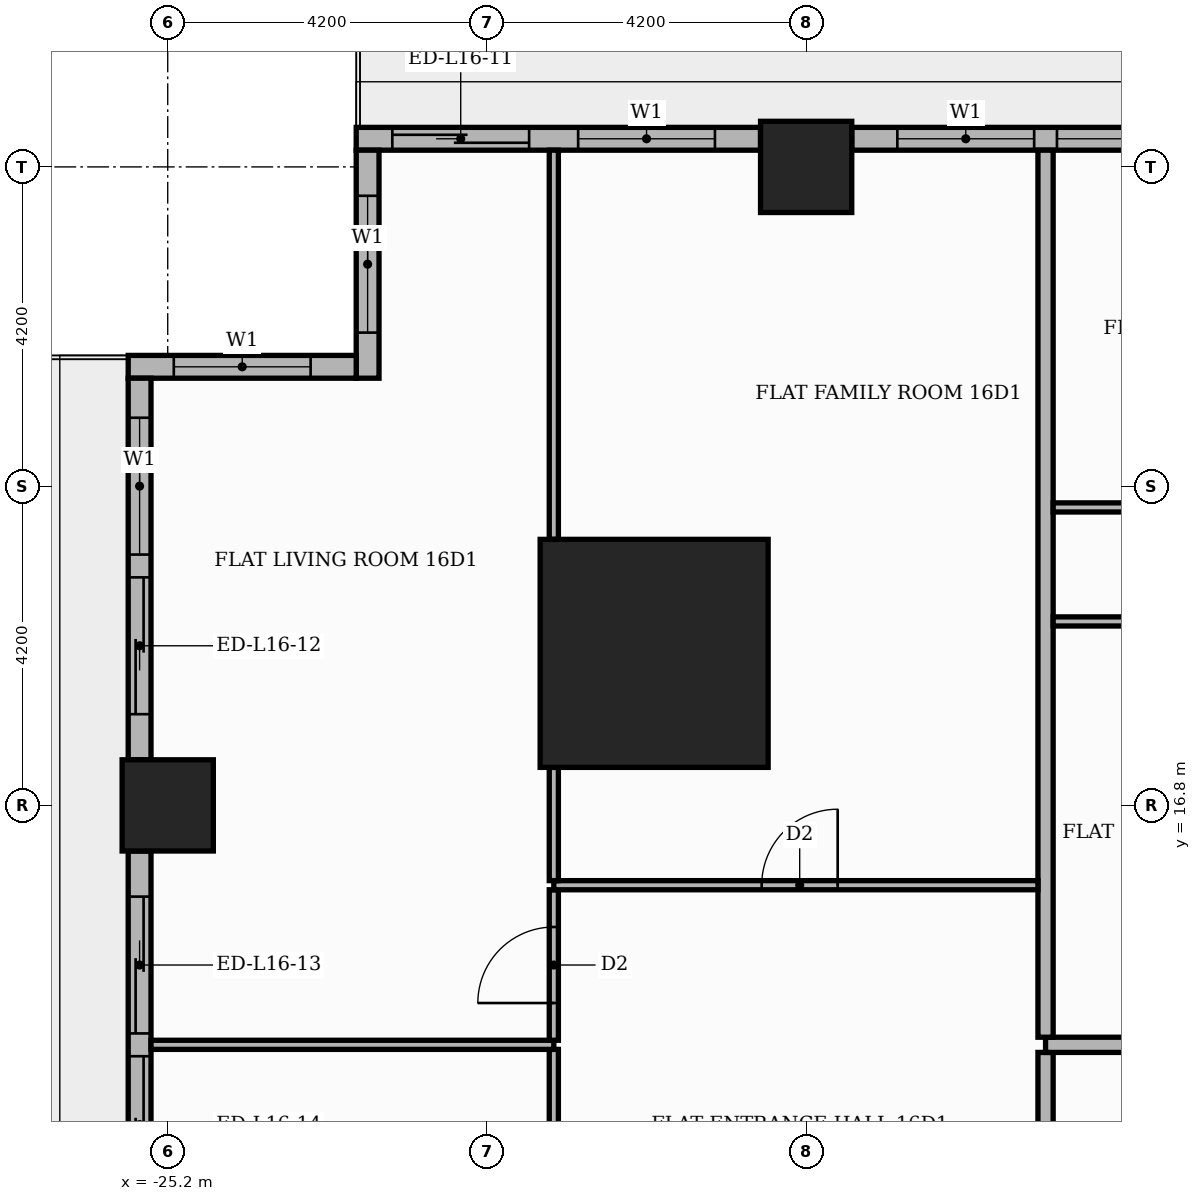
"""IFC4 building model, lengths in metres.
Left out: names, types, materials, properties, quantities, classifications, styles, units other than length and angle.
Written with IfcOpenShell. Run it as: python <this file> out.ifc"""

import sys

from ifc_helpers import new_model, si_unit, direction, frame, frame_2d, origin, origin_2d, place, context, subcontext, project, spatial, rectangle, extrude, element, fill, save


model = new_model("IFC4")
c1 = context("Model", 3, precision=1e-05, world=origin(), true_north=direction((0.0, 1.0)))
c2 = subcontext(c1, "Body", "Model", "MODEL_VIEW")
j1 = project(units=[si_unit("LENGTHUNIT", "METRE"), si_unit("PLANEANGLEUNIT", "RADIAN")], contexts=[c1])
p1 = place(None, origin())
s1 = spatial("IfcSite", under=j1, at=p1, CompositionType="ELEMENT")
p2 = place(p1, origin())
s2 = spatial("IfcBuilding", under=s1, at=p2, CompositionType="ELEMENT")
p3 = place(p2, frame((0.0, 0.0, 69.9)))
s3 = spatial("IfcBuildingStorey", under=s2, at=p3, CompositionType="ELEMENT", Elevation=69.9)
p4 = place(p3, frame((-18.8, 18.8, 0.0), z_axis=(0.0, 0.0, 1.0), x_axis=(1.0, 0.0, 0.0)))
e1 = element("IfcColumn", 1, at=p4, inside=s3, PredefinedType="COLUMN", context=c2, shape_type="SweptSolid", body=[
    extrude(rectangle(XDim=3.0, YDim=3.0, at=origin_2d()), origin(), (0.0, 0.0, 1.0), 3.9),
])
for number, where, z_axis, x_axis in (
    (2, (-16.8, 25.2, 0.0), (0.0, 0.0, 1.0), (1.0, 0.0, 0.0)),
    (3, (-25.2, 16.8, 0.0), (0.0, 0.0, 1.0), (1.0, 0.0, 0.0)),
):
    element("IfcColumn", number, at=place(p3, frame(where, z_axis=z_axis, x_axis=x_axis)), inside=s3, PredefinedType="COLUMN", context=c2, shape_type="SweptSolid", body=[
        extrude(rectangle(XDim=1.2, YDim=1.2, at=origin_2d()), origin(), (0.0, 0.0, 1.0), 3.9),
    ])
p5 = place(p3, frame((-9.0, 25.57, 0.0), z_axis=(0.0, 0.0, 1.0), x_axis=(-1.0, 0.0, 0.0)))
e4 = element("IfcWall", 4, at=p5, inside=s3, PredefinedType="STANDARD", context=c2, shape_type="SweptSolid", body=[
    extrude(rectangle(XDim=7.2, YDim=0.3, at=frame_2d((3.6, 0.0))), origin(), (0.0, 0.0, 1.0), 3.4),
])
p6 = place(p5, frame((0.6, 0.0, 0.9)))
e5 = element("IfcOpeningElement", 5, at=p6, cuts=e4, PredefinedType="OPENING", context=c2, shape_type="SweptSolid", body=[
    extrude(rectangle(XDim=3.9, YDim=2.1, at=frame_2d((1.95, 1.05))), frame((0.0, 0.16, 0.0), z_axis=(0.0, -1.0, 0.0), x_axis=(1.0, 0.0, 0.0)), (0.0, 0.0, 1.0), 0.32),
])
p7 = place(p5, frame((4.8, 0.0, 0.9)))
e6 = element("IfcOpeningElement", 6, at=p7, cuts=e4, PredefinedType="OPENING", context=c2, shape_type="SweptSolid", body=[
    extrude(rectangle(XDim=1.8, YDim=2.1, at=frame_2d((0.9, 1.05))), frame((0.0, 0.16, 0.0), z_axis=(0.0, -1.0, 0.0), x_axis=(1.0, 0.0, 0.0)), (0.0, 0.0, 1.0), 0.32),
])
p8 = place(p3, frame((-17.4, 25.57, 0.0), z_axis=(0.0, 0.0, 1.0), x_axis=(-1.0, 0.0, 0.0)))
e7 = element("IfcWall", 7, at=p8, inside=s3, PredefinedType="STANDARD", context=c2, shape_type="SweptSolid", body=[
    extrude(rectangle(XDim=5.32, YDim=0.3, at=frame_2d((2.66, 0.0))), origin(), (0.0, 0.0, 1.0), 3.4),
])
p9 = place(p8, frame((0.6, 0.0, 0.9)))
e8 = element("IfcOpeningElement", 8, at=p9, cuts=e7, PredefinedType="OPENING", context=c2, shape_type="SweptSolid", body=[
    extrude(rectangle(XDim=1.8, YDim=2.1, at=frame_2d((0.9, 1.05))), frame((0.0, 0.16, 0.0), z_axis=(0.0, -1.0, 0.0), x_axis=(1.0, 0.0, 0.0)), (0.0, 0.0, 1.0), 0.32),
])
p10 = place(p8, frame((3.045, 0.0, 0.0)))
e9 = element("IfcOpeningElement", 9, at=p10, cuts=e7, PredefinedType="OPENING", context=c2, shape_type="SweptSolid", body=[
    extrude(rectangle(XDim=1.8, YDim=2.4, at=frame_2d((0.9, 1.2))), frame((0.0, 0.16, 0.0), z_axis=(0.0, -1.0, 0.0), x_axis=(1.0, 0.0, 0.0)), (0.0, 0.0, 1.0), 0.32),
])
p11 = place(p3, frame((-22.57, 25.42, 0.0), z_axis=(0.0, 0.0, 1.0), x_axis=(0.0, -1.0, 0.0)))
e10 = element("IfcWall", 10, at=p11, inside=s3, PredefinedType="STANDARD", context=c2, shape_type="SweptSolid", body=[
    extrude(rectangle(XDim=3.0, YDim=0.3, at=frame_2d((1.5, 0.0))), origin(), (0.0, 0.0, 1.0), 3.4),
])
p12 = place(p11, frame((0.6, 0.0, 0.9)))
e11 = element("IfcOpeningElement", 11, at=p12, cuts=e10, PredefinedType="OPENING", context=c2, shape_type="SweptSolid", body=[
    extrude(rectangle(XDim=1.8, YDim=2.1, at=frame_2d((0.9, 1.05))), frame((0.0, 0.16, 0.0), z_axis=(0.0, -1.0, 0.0), x_axis=(1.0, 0.0, 0.0)), (0.0, 0.0, 1.0), 0.32),
])
p13 = place(p3, frame((-22.72, 22.57, 0.0), z_axis=(0.0, 0.0, 1.0), x_axis=(-1.0, 0.0, 0.0)))
e12 = element("IfcWall", 12, at=p13, inside=s3, PredefinedType="STANDARD", context=c2, shape_type="SweptSolid", body=[
    extrude(rectangle(XDim=3.0, YDim=0.3, at=frame_2d((1.5, 0.0))), origin(), (0.0, 0.0, 1.0), 3.4),
])
p14 = place(p13, frame((0.6, 0.0, 0.9)))
e13 = element("IfcOpeningElement", 13, at=p14, cuts=e12, PredefinedType="OPENING", context=c2, shape_type="SweptSolid", body=[
    extrude(rectangle(XDim=1.8, YDim=2.1, at=frame_2d((0.9, 1.05))), frame((0.0, 0.16, 0.0), z_axis=(0.0, -1.0, 0.0), x_axis=(1.0, 0.0, 0.0)), (0.0, 0.0, 1.0), 0.32),
])
p15 = place(p3, frame((-25.57, 22.42, 0.0), z_axis=(0.0, 0.0, 1.0), x_axis=(0.0, -1.0, 0.0)))
e14 = element("IfcWall", 14, at=p15, inside=s3, PredefinedType="STANDARD", context=c2, shape_type="SweptSolid", body=[
    extrude(rectangle(XDim=5.02, YDim=0.3, at=frame_2d((2.51, 0.0))), origin(), (0.0, 0.0, 1.0), 3.4),
])
p16 = place(p15, frame((0.52, 0.0, 0.9)))
e15 = element("IfcOpeningElement", 15, at=p16, cuts=e14, PredefinedType="OPENING", context=c2, shape_type="SweptSolid", body=[
    extrude(rectangle(XDim=1.8, YDim=2.1, at=frame_2d((0.9, 1.05))), frame((0.0, 0.16, 0.0), z_axis=(0.0, -1.0, 0.0), x_axis=(1.0, 0.0, 0.0)), (0.0, 0.0, 1.0), 0.32),
])
p17 = place(p15, frame((2.62, 0.0, 0.0)))
e16 = element("IfcOpeningElement", 16, at=p17, cuts=e14, PredefinedType="OPENING", context=c2, shape_type="SweptSolid", body=[
    extrude(rectangle(XDim=1.8, YDim=2.4, at=frame_2d((0.9, 1.2))), frame((0.0, 0.16, 0.0), z_axis=(0.0, -1.0, 0.0), x_axis=(1.0, 0.0, 0.0)), (0.0, 0.0, 1.0), 0.32),
])
p18 = place(p3, frame((-25.57, 16.2, 0.0), z_axis=(0.0, 0.0, 1.0), x_axis=(0.0, -1.0, 0.0)))
e17 = element("IfcWall", 17, at=p18, inside=s3, PredefinedType="STANDARD", context=c2, shape_type="SweptSolid", body=[
    extrude(rectangle(XDim=7.2, YDim=0.3, at=frame_2d((3.6, 0.0))), origin(), (0.0, 0.0, 1.0), 3.4),
])
p19 = place(p18, frame((0.6, 0.0, 0.0)))
e18 = element("IfcOpeningElement", 18, at=p19, cuts=e17, PredefinedType="OPENING", context=c2, shape_type="SweptSolid", body=[
    extrude(rectangle(XDim=1.8, YDim=2.4, at=frame_2d((0.9, 1.2))), frame((0.0, 0.16, 0.0), z_axis=(0.0, -1.0, 0.0), x_axis=(1.0, 0.0, 0.0)), (0.0, 0.0, 1.0), 0.32),
])
p20 = place(p18, frame((2.7, 0.0, 0.0)))
e19 = element("IfcOpeningElement", 19, at=p20, cuts=e17, PredefinedType="OPENING", context=c2, shape_type="SweptSolid", body=[
    extrude(rectangle(XDim=1.8, YDim=2.4, at=frame_2d((0.9, 1.2))), frame((0.0, 0.16, 0.0), z_axis=(0.0, -1.0, 0.0), x_axis=(1.0, 0.0, 0.0)), (0.0, 0.0, 1.0), 0.32),
])
p21 = place(p18, frame((4.8, 0.0, 0.9)))
e20 = element("IfcOpeningElement", 20, at=p21, cuts=e17, PredefinedType="OPENING", context=c2, shape_type="SweptSolid", body=[
    extrude(rectangle(XDim=1.8, YDim=2.1, at=frame_2d((0.9, 1.05))), frame((0.0, 0.16, 0.0), z_axis=(0.0, -1.0, 0.0), x_axis=(1.0, 0.0, 0.0)), (0.0, 0.0, 1.0), 0.32),
])
p22 = place(p3, frame((-13.65, 5.35, 0.0), z_axis=(0.0, 0.0, 1.0), x_axis=(0.0, 1.0, 0.0)))
e21 = element("IfcWall", 21, at=p22, inside=s3, PredefinedType="PARTITIONING", context=c2, shape_type="SweptSolid", body=[
    extrude(rectangle(XDim=8.2, YDim=0.2, at=frame_2d((4.1, 0.0))), origin(), (0.0, 0.0, 1.0), 3.4),
])
p23 = place(p22, frame((5.65, 0.0, 0.0)))
e22 = element("IfcOpeningElement", 22, at=p23, cuts=e21, PredefinedType="OPENING", context=c2, shape_type="SweptSolid", body=[
    extrude(rectangle(XDim=1.1, YDim=2.4, at=frame_2d((0.55, 1.2))), frame((0.0, 0.11, 0.0), z_axis=(0.0, -1.0, 0.0), x_axis=(1.0, 0.0, 0.0)), (0.0, 0.0, 1.0), 0.22),
])
p24 = place(p3, frame((-20.12, 9.51, 0.0), z_axis=(0.0, 0.0, 1.0), x_axis=(0.0, 1.0, 0.0)))
e23 = element("IfcWall", 23, at=p24, inside=s3, PredefinedType="PARTITIONING", context=c2, shape_type="SweptSolid", body=[
    extrude(rectangle(XDim=4.08, YDim=0.12, at=frame_2d((2.04, 0.0))), origin(), (0.0, 0.0, 1.0), 3.4),
])
p25 = place(p24, frame((1.59, 0.0, 0.0)))
e24 = element("IfcOpeningElement", 24, at=p25, cuts=e23, PredefinedType="OPENING", context=c2, shape_type="SweptSolid", body=[
    extrude(rectangle(XDim=0.9, YDim=2.1, at=frame_2d((0.45, 1.05))), frame((0.0, 0.07, 0.0), z_axis=(0.0, -1.0, 0.0), x_axis=(1.0, 0.0, 0.0)), (0.0, 0.0, 1.0), 0.14),
])
p26 = place(p3, frame((-25.42, 13.65, 0.0), z_axis=(0.0, 0.0, 1.0), x_axis=(1.0, 0.0, 0.0)))
e25 = element("IfcWall", 25, at=p26, inside=s3, PredefinedType="PARTITIONING", context=c2, shape_type="SweptSolid", body=[
    extrude(rectangle(XDim=5.3, YDim=0.12, at=frame_2d((2.65, 0.0))), origin(), (0.0, 0.0, 1.0), 3.4),
])
p27 = place(p3, frame((-13.65, 13.65, 0.0), z_axis=(0.0, 0.0, 1.0), x_axis=(1.0, 0.0, 0.0)))
e26 = element("IfcWall", 26, at=p27, inside=s3, PredefinedType="PARTITIONING", context=c2, shape_type="SweptSolid", body=[
    extrude(rectangle(XDim=39.07, YDim=0.2, at=frame_2d((19.535, 0.0))), origin(), (0.0, 0.0, 1.0), 3.4),
])
p28 = place(p27, frame((23.6, 0.0, 0.0)))
e27 = element("IfcOpeningElement", 27, at=p28, cuts=e26, PredefinedType="OPENING", context=c2, shape_type="SweptSolid", body=[
    extrude(rectangle(XDim=1.1, YDim=2.4, at=frame_2d((0.55, 1.2))), frame((0.0, 0.11, 0.0), z_axis=(0.0, -1.0, 0.0), x_axis=(1.0, 0.0, 0.0)), (0.0, 0.0, 1.0), 0.22),
])
p29 = place(p3, frame((-20.12, 13.71, 0.0), z_axis=(0.0, 0.0, 1.0), x_axis=(0.0, 1.0, 0.0)))
e28 = element("IfcWall", 28, at=p29, inside=s3, PredefinedType="PARTITIONING", context=c2, shape_type="SweptSolid", body=[
    extrude(rectangle(XDim=1.98, YDim=0.12, at=frame_2d((0.99, 0.0))), origin(), (0.0, 0.0, 1.0), 3.4),
])
p30 = place(p29, frame((0.49, 0.0, 0.0)))
e29 = element("IfcOpeningElement", 29, at=p30, cuts=e28, PredefinedType="OPENING", context=c2, shape_type="SweptSolid", body=[
    extrude(rectangle(XDim=1.0, YDim=2.1, at=frame_2d((0.5, 1.05))), frame((0.0, 0.07, 0.0), z_axis=(0.0, -1.0, 0.0), x_axis=(1.0, 0.0, 0.0)), (0.0, 0.0, 1.0), 0.14),
])
p31 = place(p3, frame((-13.65, 13.75, 0.0), z_axis=(0.0, 0.0, 1.0), x_axis=(0.0, 1.0, 0.0)))
e30 = element("IfcWall", 30, at=p31, inside=s3, PredefinedType="PARTITIONING", context=c2, shape_type="SweptSolid", body=[
    extrude(rectangle(XDim=11.67, YDim=0.2, at=frame_2d((5.835, 0.0))), origin(), (0.0, 0.0, 1.0), 3.4),
])
p32 = place(p3, frame((-20.12, 15.75, 0.0), z_axis=(0.0, 0.0, 1.0), x_axis=(1.0, 0.0, 0.0)))
e31 = element("IfcWall", 31, at=p32, inside=s3, PredefinedType="PARTITIONING", context=c2, shape_type="SweptSolid", body=[
    extrude(rectangle(XDim=6.37, YDim=0.12, at=frame_2d((3.185, 0.0))), origin(), (0.0, 0.0, 1.0), 3.4),
])
p33 = place(p32, frame((2.735, 0.0, 0.0)))
e32 = element("IfcOpeningElement", 32, at=p33, cuts=e31, PredefinedType="OPENING", context=c2, shape_type="SweptSolid", body=[
    extrude(rectangle(XDim=1.0, YDim=2.1, at=frame_2d((0.5, 1.05))), frame((0.0, 0.07, 0.0), z_axis=(0.0, -1.0, 0.0), x_axis=(1.0, 0.0, 0.0)), (0.0, 0.0, 1.0), 0.14),
])
p34 = place(p3, frame((-20.12, 15.81, 0.0), z_axis=(0.0, 0.0, 1.0), x_axis=(0.0, 1.0, 0.0)))
e33 = element("IfcWall", 33, at=p34, inside=s3, PredefinedType="PARTITIONING", context=c2, shape_type="SweptSolid", body=[
    extrude(rectangle(XDim=1.49, YDim=0.12, at=frame_2d((0.745, 0.0))), origin(), (0.0, 0.0, 1.0), 3.4),
])
p35 = place(p3, frame((-13.55, 19.22, 0.0), z_axis=(0.0, 0.0, 1.0), x_axis=(1.0, 0.0, 0.0)))
e34 = element("IfcWall", 34, at=p35, inside=s3, PredefinedType="PARTITIONING", context=c2, shape_type="SweptSolid", body=[
    extrude(rectangle(XDim=20.9, YDim=0.12, at=frame_2d((10.45, 0.0))), origin(), (0.0, 0.0, 1.0), 3.4),
])
p36 = place(p35, frame((17.3, 0.0, 0.0)))
e35 = element("IfcOpeningElement", 35, at=p36, cuts=e34, PredefinedType="OPENING", context=c2, shape_type="SweptSolid", body=[
    extrude(rectangle(XDim=0.9, YDim=2.1, at=frame_2d((0.45, 1.05))), frame((0.0, 0.07, 0.0), z_axis=(0.0, -1.0, 0.0), x_axis=(1.0, 0.0, 0.0)), (0.0, 0.0, 1.0), 0.14),
])
p37 = place(p35, frame((12.35, 0.0, 0.0)))
e36 = element("IfcOpeningElement", 36, at=p37, cuts=e34, PredefinedType="OPENING", context=c2, shape_type="SweptSolid", body=[
    extrude(rectangle(XDim=0.9, YDim=2.1, at=frame_2d((0.45, 1.05))), frame((0.0, 0.07, 0.0), z_axis=(0.0, -1.0, 0.0), x_axis=(1.0, 0.0, 0.0)), (0.0, 0.0, 1.0), 0.14),
])
p38 = place(p35, frame((9.2, 0.0, 0.0)))
e37 = element("IfcOpeningElement", 37, at=p38, cuts=e34, PredefinedType="OPENING", context=c2, shape_type="SweptSolid", body=[
    extrude(rectangle(XDim=0.9, YDim=2.1, at=frame_2d((0.45, 1.05))), frame((0.0, 0.07, 0.0), z_axis=(0.0, -1.0, 0.0), x_axis=(1.0, 0.0, 0.0)), (0.0, 0.0, 1.0), 0.14),
])
p39 = place(p35, frame((6.725, 0.0, 0.0)))
e38 = element("IfcOpeningElement", 38, at=p39, cuts=e34, PredefinedType="OPENING", context=c2, shape_type="SweptSolid", body=[
    extrude(rectangle(XDim=0.9, YDim=2.1, at=frame_2d((0.45, 1.05))), frame((0.0, 0.07, 0.0), z_axis=(0.0, -1.0, 0.0), x_axis=(1.0, 0.0, 0.0)), (0.0, 0.0, 1.0), 0.14),
])
p40 = place(p35, frame((4.7, 0.0, 0.0)))
e39 = element("IfcOpeningElement", 39, at=p40, cuts=e34, PredefinedType="OPENING", context=c2, shape_type="SweptSolid", body=[
    extrude(rectangle(XDim=0.9, YDim=2.1, at=frame_2d((0.45, 1.05))), frame((0.0, 0.07, 0.0), z_axis=(0.0, -1.0, 0.0), x_axis=(1.0, 0.0, 0.0)), (0.0, 0.0, 1.0), 0.14),
])
p41 = place(p35, frame((1.625, 0.0, 0.0)))
e40 = element("IfcOpeningElement", 40, at=p41, cuts=e34, PredefinedType="OPENING", context=c2, shape_type="SweptSolid", body=[
    extrude(rectangle(XDim=0.9, YDim=2.1, at=frame_2d((0.45, 1.05))), frame((0.0, 0.07, 0.0), z_axis=(0.0, -1.0, 0.0), x_axis=(1.0, 0.0, 0.0)), (0.0, 0.0, 1.0), 0.14),
])
p42 = place(p3, frame((-20.12, 20.3, 0.0), z_axis=(0.0, 0.0, 1.0), x_axis=(0.0, 1.0, 0.0)))
e41 = element("IfcWall", 41, at=p42, inside=s3, PredefinedType="PARTITIONING", context=c2, shape_type="SweptSolid", body=[
    extrude(rectangle(XDim=5.12, YDim=0.12, at=frame_2d((2.56, 0.0))), origin(), (0.0, 0.0, 1.0), 3.4),
])
p43 = place(p3, frame((-13.55, 20.72, 0.0), z_axis=(0.0, 0.0, 1.0), x_axis=(1.0, 0.0, 0.0)))
e42 = element("IfcWall", 42, at=p43, inside=s3, PredefinedType="PARTITIONING", context=c2, shape_type="SweptSolid", body=[
    extrude(rectangle(XDim=38.97, YDim=0.12, at=frame_2d((19.485, 0.0))), origin(), (0.0, 0.0, 1.0), 3.4),
])
p44 = place(p43, frame((25.65, 0.0, 0.0)))
e43 = element("IfcOpeningElement", 43, at=p44, cuts=e42, PredefinedType="OPENING", context=c2, shape_type="SweptSolid", body=[
    extrude(rectangle(XDim=1.0, YDim=2.1, at=frame_2d((0.5, 1.05))), frame((0.0, 0.07, 0.0), z_axis=(0.0, -1.0, 0.0), x_axis=(1.0, 0.0, 0.0)), (0.0, 0.0, 1.0), 0.14),
])
p45 = place(p43, frame((20.45, 0.0, 0.0)))
e44 = element("IfcOpeningElement", 44, at=p45, cuts=e42, PredefinedType="OPENING", context=c2, shape_type="SweptSolid", body=[
    extrude(rectangle(XDim=0.9, YDim=2.1, at=frame_2d((0.45, 1.05))), frame((0.0, 0.07, 0.0), z_axis=(0.0, -1.0, 0.0), x_axis=(1.0, 0.0, 0.0)), (0.0, 0.0, 1.0), 0.14),
])
p46 = place(p43, frame((9.95, 0.0, 0.0)))
e45 = element("IfcOpeningElement", 45, at=p46, cuts=e42, PredefinedType="OPENING", context=c2, shape_type="SweptSolid", body=[
    extrude(rectangle(XDim=0.9, YDim=2.1, at=frame_2d((0.45, 1.05))), frame((0.0, 0.07, 0.0), z_axis=(0.0, -1.0, 0.0), x_axis=(1.0, 0.0, 0.0)), (0.0, 0.0, 1.0), 0.14),
])
p47 = place(p43, frame((2.6, 0.0, 0.0)))
e46 = element("IfcOpeningElement", 46, at=p47, cuts=e42, PredefinedType="OPENING", context=c2, shape_type="SweptSolid", body=[
    extrude(rectangle(XDim=0.9, YDim=2.1, at=frame_2d((0.45, 1.05))), frame((0.0, 0.07, 0.0), z_axis=(0.0, -1.0, 0.0), x_axis=(1.0, 0.0, 0.0)), (0.0, 0.0, 1.0), 0.14),
])
p48 = place(p6, origin())
e47 = element("IfcWindow", 47, at=p48, inside=s3, PartitioningType="SINGLE_PANEL", PredefinedType="WINDOW", context=c2, shape_type="SweptSolid", body=[
    extrude(rectangle(XDim=3.9, YDim=2.1, at=frame_2d((1.95, 1.05))), frame((0.0, 0.03, 0.0), z_axis=(0.0, -1.0, 0.0), x_axis=(1.0, 0.0, 0.0)), (0.0, 0.0, 1.0), 0.06),
])
fill(e5, e47)
p49 = place(p7, origin())
e48 = element("IfcWindow", 48, at=p49, inside=s3, PartitioningType="SINGLE_PANEL", PredefinedType="WINDOW", context=c2, shape_type="SweptSolid", body=[
    extrude(rectangle(XDim=1.8, YDim=2.1, at=frame_2d((0.9, 1.05))), frame((0.0, 0.03, 0.0), z_axis=(0.0, -1.0, 0.0), x_axis=(1.0, 0.0, 0.0)), (0.0, 0.0, 1.0), 0.06),
])
fill(e6, e48)
p50 = place(p9, origin())
e49 = element("IfcWindow", 49, at=p50, inside=s3, PartitioningType="SINGLE_PANEL", PredefinedType="WINDOW", context=c2, shape_type="SweptSolid", body=[
    extrude(rectangle(XDim=1.8, YDim=2.1, at=frame_2d((0.9, 1.05))), frame((0.0, 0.03, 0.0), z_axis=(0.0, -1.0, 0.0), x_axis=(1.0, 0.0, 0.0)), (0.0, 0.0, 1.0), 0.06),
])
fill(e8, e49)
p51 = place(p10, origin())
e50 = element("IfcDoor", 50, at=p51, inside=s3, OperationType="SLIDING_TO_RIGHT", PredefinedType="DOOR", context=c2, shape_type="SweptSolid", body=[
    extrude(rectangle(XDim=1.8, YDim=2.4, at=frame_2d((0.9, 1.2))), frame((0.0, 0.025, 0.0), z_axis=(0.0, -1.0, 0.0), x_axis=(1.0, 0.0, 0.0)), (0.0, 0.0, 1.0), 0.05),
])
fill(e9, e50)
p52 = place(p12, origin())
e51 = element("IfcWindow", 51, at=p52, inside=s3, PartitioningType="SINGLE_PANEL", PredefinedType="WINDOW", context=c2, shape_type="SweptSolid", body=[
    extrude(rectangle(XDim=1.8, YDim=2.1, at=frame_2d((0.9, 1.05))), frame((0.0, 0.03, 0.0), z_axis=(0.0, -1.0, 0.0), x_axis=(1.0, 0.0, 0.0)), (0.0, 0.0, 1.0), 0.06),
])
fill(e11, e51)
p53 = place(p14, origin())
e52 = element("IfcWindow", 52, at=p53, inside=s3, PartitioningType="SINGLE_PANEL", PredefinedType="WINDOW", context=c2, shape_type="SweptSolid", body=[
    extrude(rectangle(XDim=1.8, YDim=2.1, at=frame_2d((0.9, 1.05))), frame((0.0, 0.03, 0.0), z_axis=(0.0, -1.0, 0.0), x_axis=(1.0, 0.0, 0.0)), (0.0, 0.0, 1.0), 0.06),
])
fill(e13, e52)
p54 = place(p16, origin())
e53 = element("IfcWindow", 53, at=p54, inside=s3, PartitioningType="SINGLE_PANEL", PredefinedType="WINDOW", context=c2, shape_type="SweptSolid", body=[
    extrude(rectangle(XDim=1.8, YDim=2.1, at=frame_2d((0.9, 1.05))), frame((0.0, 0.03, 0.0), z_axis=(0.0, -1.0, 0.0), x_axis=(1.0, 0.0, 0.0)), (0.0, 0.0, 1.0), 0.06),
])
fill(e15, e53)
p55 = place(p17, origin())
e54 = element("IfcDoor", 54, at=p55, inside=s3, OperationType="SLIDING_TO_RIGHT", PredefinedType="DOOR", context=c2, shape_type="SweptSolid", body=[
    extrude(rectangle(XDim=1.8, YDim=2.4, at=frame_2d((0.9, 1.2))), frame((0.0, 0.025, 0.0), z_axis=(0.0, -1.0, 0.0), x_axis=(1.0, 0.0, 0.0)), (0.0, 0.0, 1.0), 0.05),
])
fill(e16, e54)
p56 = place(p19, origin())
e55 = element("IfcDoor", 55, at=p56, inside=s3, OperationType="SLIDING_TO_LEFT", PredefinedType="DOOR", context=c2, shape_type="SweptSolid", body=[
    extrude(rectangle(XDim=1.8, YDim=2.4, at=frame_2d((0.9, 1.2))), frame((0.0, 0.025, 0.0), z_axis=(0.0, -1.0, 0.0), x_axis=(1.0, 0.0, 0.0)), (0.0, 0.0, 1.0), 0.05),
])
fill(e18, e55)
p57 = place(p20, origin())
e56 = element("IfcDoor", 56, at=p57, inside=s3, OperationType="SLIDING_TO_RIGHT", PredefinedType="DOOR", context=c2, shape_type="SweptSolid", body=[
    extrude(rectangle(XDim=1.8, YDim=2.4, at=frame_2d((0.9, 1.2))), frame((0.0, 0.025, 0.0), z_axis=(0.0, -1.0, 0.0), x_axis=(1.0, 0.0, 0.0)), (0.0, 0.0, 1.0), 0.05),
])
fill(e19, e56)
p58 = place(p33, origin())
e57 = element("IfcDoor", 57, at=p58, inside=s3, OperationType="SINGLE_SWING_RIGHT", PredefinedType="DOOR", context=c2, shape_type="SweptSolid", body=[
    extrude(rectangle(XDim=1.0, YDim=2.1, at=frame_2d((0.5, 1.05))), frame((0.0, 0.025, 0.0), z_axis=(0.0, -1.0, 0.0), x_axis=(1.0, 0.0, 0.0)), (0.0, 0.0, 1.0), 0.05),
])
fill(e32, e57)
p59 = place(p30, origin())
e58 = element("IfcDoor", 58, at=p59, inside=s3, OperationType="SINGLE_SWING_LEFT", PredefinedType="DOOR", context=c2, shape_type="SweptSolid", body=[
    extrude(rectangle(XDim=1.0, YDim=2.1, at=frame_2d((0.5, 1.05))), frame((0.0, 0.025, 0.0), z_axis=(0.0, -1.0, 0.0), x_axis=(1.0, 0.0, 0.0)), (0.0, 0.0, 1.0), 0.05),
])
fill(e29, e58)
save(model, sys.argv[1])
